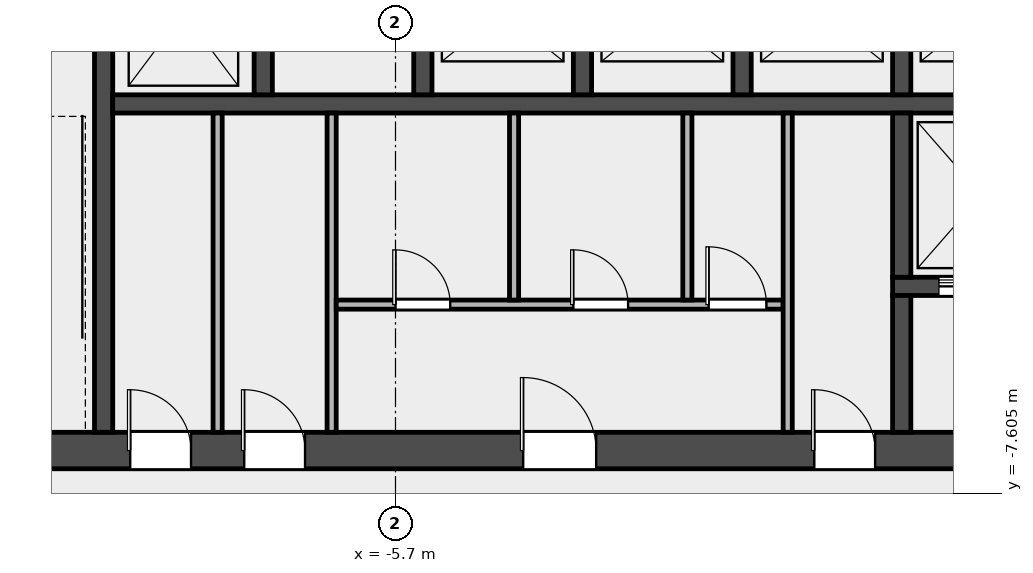
"""IFC4 building model, lengths in metres.
Left out: names, types, materials, properties, quantities, classifications, styles, units other than length and angle.
Written with IfcOpenShell. Run it as: python <this file> out.ifc"""

import sys

from ifc_helpers import new_model, si_unit, direction, frame, frame_2d, origin, place, context, subcontext, project, spatial, rectangle, extrude, element, fill, save


model = new_model("IFC4")
c1 = context("Model", 3, precision=1e-05, world=origin(), true_north=direction((0.0, 1.0)))
c2 = subcontext(c1, "Body", "Model", "MODEL_VIEW")
j1 = project(units=[si_unit("LENGTHUNIT", "METRE"), si_unit("PLANEANGLEUNIT", "RADIAN")], contexts=[c1])
p1 = place(None, origin())
s1 = spatial("IfcSite", under=j1, at=p1, CompositionType="ELEMENT")
p2 = place(p1, origin())
s2 = spatial("IfcBuilding", under=s1, at=p2, CompositionType="ELEMENT")
p3 = place(p2, frame((0.0, 0.0, 69.4)))
s3 = spatial("IfcBuildingStorey", under=s2, at=p3, CompositionType="ELEMENT", Elevation=69.4)
p4 = place(p3, frame((-14.4, -6.9, 0.0), z_axis=(0.0, 0.0, 1.0), x_axis=(1.0, 0.0, 0.0)))
e1 = element("IfcWall", 1, at=p4, inside=s3, PredefinedType="SHEAR", context=c2, shape_type="SweptSolid", body=[
    extrude(rectangle(XDim=28.8, YDim=0.6, at=frame_2d((14.4, 0.0))), origin(), (0.0, 0.0, 1.0), 4.5),
])
p5 = place(p4, frame((4.337, 0.0, 0.0)))
e2 = element("IfcOpeningElement", 2, at=p5, cuts=e1, PredefinedType="OPENING", context=c2, shape_type="SweptSolid", body=[
    extrude(rectangle(XDim=1.0, YDim=2.1, at=frame_2d((0.5, 1.05))), frame((0.0, 0.312, 0.0), z_axis=(0.0, -1.0, 0.0), x_axis=(1.0, 0.0, 0.0)), (0.0, 0.0, 1.0), 0.624),
])
p6 = place(p4, frame((6.212, 0.0, 0.0)))
e3 = element("IfcOpeningElement", 3, at=p6, cuts=e1, PredefinedType="OPENING", context=c2, shape_type="SweptSolid", body=[
    extrude(rectangle(XDim=1.0, YDim=2.1, at=frame_2d((0.5, 1.05))), frame((0.0, 0.312, 0.0), z_axis=(0.0, -1.0, 0.0), x_axis=(1.0, 0.0, 0.0)), (0.0, 0.0, 1.0), 0.624),
])
p7 = place(p4, frame((10.8, 0.0, 0.0)))
e4 = element("IfcOpeningElement", 4, at=p7, cuts=e1, PredefinedType="OPENING", context=c2, shape_type="SweptSolid", body=[
    extrude(rectangle(XDim=1.2, YDim=2.1, at=frame_2d((0.6, 1.05))), frame((0.0, 0.312, 0.0), z_axis=(0.0, -1.0, 0.0), x_axis=(1.0, 0.0, 0.0)), (0.0, 0.0, 1.0), 0.624),
])
p8 = place(p4, frame((15.587, 0.0, 0.0)))
e5 = element("IfcOpeningElement", 5, at=p8, cuts=e1, PredefinedType="OPENING", context=c2, shape_type="SweptSolid", body=[
    extrude(rectangle(XDim=1.0, YDim=2.1, at=frame_2d((0.5, 1.05))), frame((0.0, 0.312, 0.0), z_axis=(0.0, -1.0, 0.0), x_axis=(1.0, 0.0, 0.0)), (0.0, 0.0, 1.0), 0.624),
])
p9 = place(p4, frame((18.75, 0.0, 0.0)))
e6 = element("IfcOpeningElement", 6, at=p9, cuts=e1, PredefinedType="OPENING", context=c2, shape_type="SweptSolid", body=[
    extrude(rectangle(XDim=1.8, YDim=2.1, at=frame_2d((0.9, 1.05))), frame((0.0, 0.312, 0.0), z_axis=(0.0, -1.0, 0.0), x_axis=(1.0, 0.0, 0.0)), (0.0, 0.0, 1.0), 0.624),
])
p10 = place(p4, frame((23.087, 0.0, 0.0)))
e7 = element("IfcOpeningElement", 7, at=p10, cuts=e1, PredefinedType="OPENING", context=c2, shape_type="SweptSolid", body=[
    extrude(rectangle(XDim=1.0, YDim=2.1, at=frame_2d((0.5, 1.05))), frame((0.0, 0.312, 0.0), z_axis=(0.0, -1.0, 0.0), x_axis=(1.0, 0.0, 0.0)), (0.0, 0.0, 1.0), 0.624),
])
p11 = place(p3, frame((-10.5, -6.6, 0.0), z_axis=(0.0, 0.0, 1.0), x_axis=(0.0, 1.0, 0.0)))
e8 = element("IfcWall", 8, at=p11, inside=s3, PredefinedType="SHEAR", context=c2, shape_type="SweptSolid", body=[
    extrude(rectangle(XDim=8.55, YDim=0.3, at=frame_2d((4.275, 0.0))), origin(), (0.0, 0.0, 1.0), 4.5),
])
p12 = place(p3, frame((-10.35, -1.2, 0.0), z_axis=(0.0, 0.0, 1.0), x_axis=(1.0, 0.0, 0.0)))
e9 = element("IfcWall", 9, at=p12, inside=s3, PredefinedType="SOLIDWALL", context=c2, shape_type="SweptSolid", body=[
    extrude(rectangle(XDim=20.7, YDim=0.3, at=frame_2d((10.35, 0.0))), origin(), (0.0, 0.0, 1.0), 4.5),
])
for number, where, z_axis, x_axis in (
    (10, (-7.875, -1.05, 0.0), (0.0, 0.0, 1.0), (0.0, 1.0, 0.0)),
    (11, (-5.25, -1.05, 0.0), (0.0, 0.0, 1.0), (0.0, 1.0, 0.0)),
    (12, (-2.625, -1.05, 0.0), (0.0, 0.0, 1.0), (0.0, 1.0, 0.0)),
    (13, (0.0, -1.05, 0.0), (0.0, 0.0, 1.0), (0.0, 1.0, 0.0)),
    (14, (2.625, -1.05, 0.0), (0.0, 0.0, 1.0), (0.0, 1.0, 0.0)),
):
    element("IfcWall", number, at=place(p3, frame(where, z_axis=z_axis, x_axis=x_axis)), inside=s3, PredefinedType="SOLIDWALL", context=c2, shape_type="SweptSolid", body=[
        extrude(rectangle(XDim=2.7, YDim=0.3, at=frame_2d((1.35, 0.0))), origin(), (0.0, 0.0, 1.0), 4.5),
    ])
p13 = place(p3, frame((2.475, -4.2, 0.0), z_axis=(0.0, 0.0, 1.0), x_axis=(1.0, 0.0, 0.0)))
e15 = element("IfcWall", 15, at=p13, inside=s3, PredefinedType="SOLIDWALL", context=c2, shape_type="SweptSolid", body=[
    extrude(rectangle(XDim=5.55, YDim=0.3, at=frame_2d((2.775, 0.0))), origin(), (0.0, 0.0, 1.0), 4.5),
])
p14 = place(p13, frame((0.762, 0.0, 0.0)))
e16 = element("IfcOpeningElement", 16, at=p14, cuts=e15, PredefinedType="OPENING", context=c2, shape_type="SweptSolid", body=[
    extrude(rectangle(XDim=1.4, YDim=2.1, at=frame_2d((0.7, 1.05))), frame((0.0, 0.162, 0.0), z_axis=(0.0, -1.0, 0.0), x_axis=(1.0, 0.0, 0.0)), (0.0, 0.0, 1.0), 0.324),
])
p15 = place(p13, frame((3.387, 0.0, 0.0)))
e17 = element("IfcOpeningElement", 17, at=p15, cuts=e15, PredefinedType="OPENING", context=c2, shape_type="SweptSolid", body=[
    extrude(rectangle(XDim=1.4, YDim=2.1, at=frame_2d((0.7, 1.05))), frame((0.0, 0.162, 0.0), z_axis=(0.0, -1.0, 0.0), x_axis=(1.0, 0.0, 0.0)), (0.0, 0.0, 1.0), 0.324),
])
p16 = place(p3, frame((2.625, -4.05, 0.0), z_axis=(0.0, 0.0, 1.0), x_axis=(0.0, 1.0, 0.0)))
e18 = element("IfcWall", 18, at=p16, inside=s3, PredefinedType="SOLIDWALL", context=c2, shape_type="SweptSolid", body=[
    extrude(rectangle(XDim=2.7, YDim=0.3, at=frame_2d((1.35, 0.0))), origin(), (0.0, 0.0, 1.0), 4.5),
])
p17 = place(p3, frame((2.625, -6.6, 0.0), z_axis=(0.0, 0.0, 1.0), x_axis=(0.0, 1.0, 0.0)))
e19 = element("IfcWall", 19, at=p17, inside=s3, PredefinedType="SOLIDWALL", context=c2, shape_type="SweptSolid", body=[
    extrude(rectangle(XDim=2.25, YDim=0.3, at=frame_2d((1.125, 0.0))), origin(), (0.0, 0.0, 1.0), 4.5),
])
for number, where, z_axis, x_axis in (
    (20, (-8.625, -6.6, 0.0), (0.0, 0.0, 1.0), (0.0, 1.0, 0.0)),
    (21, (-6.75, -6.6, 0.0), (0.0, 0.0, 1.0), (0.0, 1.0, 0.0)),
):
    element("IfcWall", number, at=place(p3, frame(where, z_axis=z_axis, x_axis=x_axis)), inside=s3, PredefinedType="PARTITIONING", context=c2, shape_type="SweptSolid", body=[
        extrude(rectangle(XDim=5.25, YDim=0.15, at=frame_2d((2.625, 0.0))), origin(), (0.0, 0.0, 1.0), 4.5),
    ])
p18 = place(p3, frame((-6.675, -4.5, 0.0), z_axis=(0.0, 0.0, 1.0), x_axis=(1.0, 0.0, 0.0)))
e22 = element("IfcWall", 22, at=p18, inside=s3, PredefinedType="PARTITIONING", context=c2, shape_type="SweptSolid", body=[
    extrude(rectangle(XDim=7.35, YDim=0.15, at=frame_2d((3.675, 0.0))), origin(), (0.0, 0.0, 1.0), 4.5),
])
p19 = place(p18, frame((0.975, 0.0, 0.0)))
e23 = element("IfcOpeningElement", 23, at=p19, cuts=e22, PredefinedType="OPENING", context=c2, shape_type="SweptSolid", body=[
    extrude(rectangle(XDim=0.9, YDim=2.1, at=frame_2d((0.45, 1.05))), frame((0.0, 0.087, 0.0), z_axis=(0.0, -1.0, 0.0), x_axis=(1.0, 0.0, 0.0)), (0.0, 0.0, 1.0), 0.174),
])
p20 = place(p18, frame((3.9, 0.0, 0.0)))
e24 = element("IfcOpeningElement", 24, at=p20, cuts=e22, PredefinedType="OPENING", context=c2, shape_type="SweptSolid", body=[
    extrude(rectangle(XDim=0.9, YDim=2.1, at=frame_2d((0.45, 1.05))), frame((0.0, 0.087, 0.0), z_axis=(0.0, -1.0, 0.0), x_axis=(1.0, 0.0, 0.0)), (0.0, 0.0, 1.0), 0.174),
])
p21 = place(p18, frame((6.125, 0.0, 0.0)))
e25 = element("IfcOpeningElement", 25, at=p21, cuts=e22, PredefinedType="OPENING", context=c2, shape_type="SweptSolid", body=[
    extrude(rectangle(XDim=0.95, YDim=2.1, at=frame_2d((0.475, 1.05))), frame((0.0, 0.087, 0.0), z_axis=(0.0, -1.0, 0.0), x_axis=(1.0, 0.0, 0.0)), (0.0, 0.0, 1.0), 0.174),
])
for number, where, z_axis, x_axis in (
    (26, (-3.75, -4.425, 0.0), (0.0, 0.0, 1.0), (0.0, 1.0, 0.0)),
    (27, (-0.9, -4.425, 0.0), (0.0, 0.0, 1.0), (0.0, 1.0, 0.0)),
):
    element("IfcWall", number, at=place(p3, frame(where, z_axis=z_axis, x_axis=x_axis)), inside=s3, PredefinedType="PARTITIONING", context=c2, shape_type="SweptSolid", body=[
        extrude(rectangle(XDim=3.075, YDim=0.15, at=frame_2d((1.538, 0.0))), origin(), (0.0, 0.0, 1.0), 4.5),
    ])
p22 = place(p3, frame((0.75, -6.6, 0.0), z_axis=(0.0, 0.0, 1.0), x_axis=(0.0, 1.0, 0.0)))
e28 = element("IfcWall", 28, at=p22, inside=s3, PredefinedType="PARTITIONING", context=c2, shape_type="SweptSolid", body=[
    extrude(rectangle(XDim=5.25, YDim=0.15, at=frame_2d((2.625, 0.0))), origin(), (0.0, 0.0, 1.0), 4.5),
])
p23 = place(p14, origin())
e29 = element("IfcDoor", 29, at=p23, inside=s3, OperationType="DOUBLE_DOOR_SLIDING", PredefinedType="DOOR", context=c2, shape_type="SweptSolid", body=[
    extrude(rectangle(XDim=1.4, YDim=2.1, at=frame_2d((0.7, 1.05))), frame((0.0, 0.025, 0.0), z_axis=(0.0, -1.0, 0.0), x_axis=(1.0, 0.0, 0.0)), (0.0, 0.0, 1.0), 0.05),
])
fill(e16, e29)
p24 = place(p5, origin())
e30 = element("IfcDoor", 30, at=p24, inside=s3, OperationType="SINGLE_SWING_LEFT", PredefinedType="DOOR", context=c2, shape_type="SweptSolid", body=[
    extrude(rectangle(XDim=1.0, YDim=2.1, at=frame_2d((0.5, 1.05))), frame((0.0, 0.025, 0.0), z_axis=(0.0, -1.0, 0.0), x_axis=(1.0, 0.0, 0.0)), (0.0, 0.0, 1.0), 0.05),
])
fill(e2, e30)
p25 = place(p6, origin())
e31 = element("IfcDoor", 31, at=p25, inside=s3, OperationType="SINGLE_SWING_LEFT", PredefinedType="DOOR", context=c2, shape_type="SweptSolid", body=[
    extrude(rectangle(XDim=1.0, YDim=2.1, at=frame_2d((0.5, 1.05))), frame((0.0, 0.025, 0.0), z_axis=(0.0, -1.0, 0.0), x_axis=(1.0, 0.0, 0.0)), (0.0, 0.0, 1.0), 0.05),
])
fill(e3, e31)
p26 = place(p7, origin())
e32 = element("IfcDoor", 32, at=p26, inside=s3, OperationType="SINGLE_SWING_LEFT", PredefinedType="DOOR", context=c2, shape_type="SweptSolid", body=[
    extrude(rectangle(XDim=1.2, YDim=2.1, at=frame_2d((0.6, 1.05))), frame((0.0, 0.025, 0.0), z_axis=(0.0, -1.0, 0.0), x_axis=(1.0, 0.0, 0.0)), (0.0, 0.0, 1.0), 0.05),
])
fill(e4, e32)
p27 = place(p19, origin())
e33 = element("IfcDoor", 33, at=p27, inside=s3, OperationType="SINGLE_SWING_LEFT", PredefinedType="DOOR", context=c2, shape_type="SweptSolid", body=[
    extrude(rectangle(XDim=0.9, YDim=2.1, at=frame_2d((0.45, 1.05))), frame((0.0, 0.025, 0.0), z_axis=(0.0, -1.0, 0.0), x_axis=(1.0, 0.0, 0.0)), (0.0, 0.0, 1.0), 0.05),
])
fill(e23, e33)
p28 = place(p20, origin())
e34 = element("IfcDoor", 34, at=p28, inside=s3, OperationType="SINGLE_SWING_LEFT", PredefinedType="DOOR", context=c2, shape_type="SweptSolid", body=[
    extrude(rectangle(XDim=0.9, YDim=2.1, at=frame_2d((0.45, 1.05))), frame((0.0, 0.025, 0.0), z_axis=(0.0, -1.0, 0.0), x_axis=(1.0, 0.0, 0.0)), (0.0, 0.0, 1.0), 0.05),
])
fill(e24, e34)
p29 = place(p21, origin())
e35 = element("IfcDoor", 35, at=p29, inside=s3, OperationType="SINGLE_SWING_LEFT", PredefinedType="DOOR", context=c2, shape_type="SweptSolid", body=[
    extrude(rectangle(XDim=0.95, YDim=2.1, at=frame_2d((0.475, 1.05))), frame((0.0, 0.025, 0.0), z_axis=(0.0, -1.0, 0.0), x_axis=(1.0, 0.0, 0.0)), (0.0, 0.0, 1.0), 0.05),
])
fill(e25, e35)
p30 = place(p8, origin())
e36 = element("IfcDoor", 36, at=p30, inside=s3, OperationType="SINGLE_SWING_LEFT", PredefinedType="DOOR", context=c2, shape_type="SweptSolid", body=[
    extrude(rectangle(XDim=1.0, YDim=2.1, at=frame_2d((0.5, 1.05))), frame((0.0, 0.025, 0.0), z_axis=(0.0, -1.0, 0.0), x_axis=(1.0, 0.0, 0.0)), (0.0, 0.0, 1.0), 0.05),
])
fill(e5, e36)
save(model, sys.argv[1])
